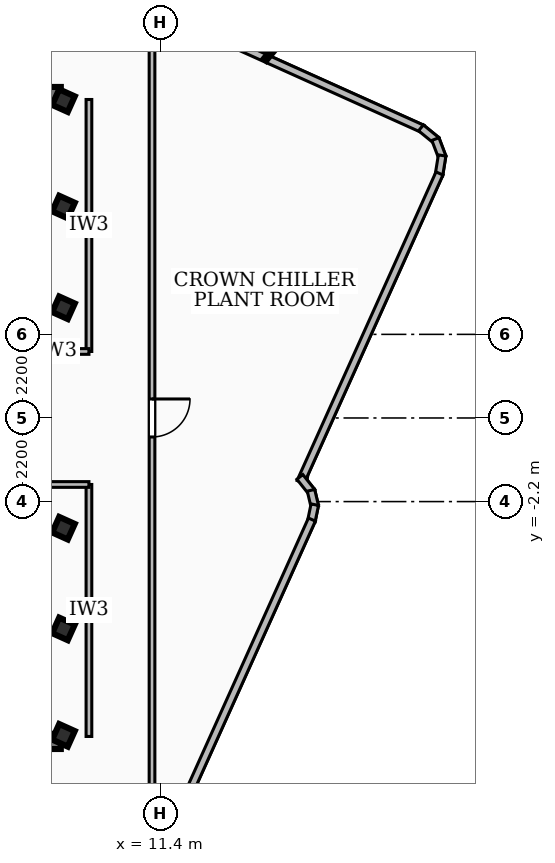
"""IFC4 building model, lengths in metres.
Left out: names, types, materials, properties, quantities, classifications, styles, units other than length and angle.
Written with IfcOpenShell. Run it as: python <this file> out.ifc"""

import sys

from ifc_helpers import new_model, si_unit, direction, frame, frame_2d, origin, origin_2d, place, context, subcontext, project, spatial, rectangle, hollow_rectangle, extrude, element, fill, save


model = new_model("IFC4")
c1 = context("Model", 3, precision=1e-05, world=origin(), true_north=direction((0.0, 1.0)))
c2 = subcontext(c1, "Body", "Model", "MODEL_VIEW")
j1 = project(units=[si_unit("LENGTHUNIT", "METRE"), si_unit("PLANEANGLEUNIT", "RADIAN")], contexts=[c1])
p1 = place(None, origin())
s1 = spatial("IfcSite", under=j1, at=p1, CompositionType="ELEMENT")
p2 = place(p1, origin())
s2 = spatial("IfcBuilding", under=s1, at=p2, CompositionType="ELEMENT")
p3 = place(p2, frame((0.0, 0.0, 297.54)))
s3 = spatial("IfcBuildingStorey", under=s2, at=p3, CompositionType="ELEMENT", Elevation=297.54)
for number, where, z_axis, x_axis in (
    (1, (-8.78, 8.51, 0.0), (0.0, 0.0, 1.0), (1.0, 0.0, 0.0)),
    (2, (8.78, -8.51, 0.0), (0.0, 0.0, 1.0), (-1.0, 0.0, 0.0)),
):
    element("IfcWall", number, at=place(p3, frame(where, z_axis=z_axis, x_axis=x_axis)), inside=s3, PredefinedType="SHEAR", context=c2, shape_type="SweptSolid", body=[
        extrude(rectangle(XDim=17.56, YDim=0.4, at=frame_2d((8.78, 0.0))), origin(), (0.0, 0.0, 1.0), 3.84),
    ])
for number, where, z_axis, x_axis in (
    (3, (8.85, -5.55, 0.0), (0.0, 0.0, 1.0), (0.411, 0.912, 0.0)),
    (4, (8.85, -2.9, 0.0), (0.0, 0.0, 1.0), (0.411, 0.912, 0.0)),
    (5, (8.85, 2.9, 0.0), (0.0, 0.0, 1.0), (0.411, 0.912, 0.0)),
    (6, (8.85, 5.55, 0.0), (0.0, 0.0, 1.0), (0.411, 0.912, 0.0)),
    (7, (8.85, -8.35, 0.0), (0.0, 0.0, 1.0), (0.411, 0.912, 0.0)),
    (8, (8.85, 8.35, 0.0), (0.0, 0.0, 1.0), (0.411, 0.912, 0.0)),
):
    element("IfcColumn", number, at=place(p3, frame(where, z_axis=z_axis, x_axis=x_axis)), inside=s3, PredefinedType="COLUMN", context=c2, shape_type="SweptSolid", body=[
        extrude(hollow_rectangle(XDim=0.45, YDim=0.45, WallThickness=0.022, at=origin_2d()), origin(), (0.0, 0.0, 1.0), 4.14),
    ])
p4 = place(p3, frame((10.126, 11.288, 0.0), z_axis=(0.0, 0.0, 1.0), x_axis=(0.911826178024, -0.410576449728, 0.0)))
e9 = element("IfcWall", 9, at=p4, inside=s3, PredefinedType="SOLIDWALL", context=c2, shape_type="SweptSolid", body=[
    extrude(rectangle(XDim=8.963, YDim=0.2, at=frame_2d((4.482, 0.0))), origin(), (0.0, 0.0, 1.0), 3.84),
])
p5 = place(p3, frame((18.257, 7.634, 0.0), z_axis=(0.0, 0.0, 1.0), x_axis=(0.773771583857, -0.63346470779, 0.0)))
e10 = element("IfcWall", 10, at=p5, inside=s3, PredefinedType="SOLIDWALL", context=c2, shape_type="SweptSolid", body=[
    extrude(rectangle(XDim=0.527, YDim=0.2, at=frame_2d((0.264, 0.0))), origin(), (0.0, 0.0, 1.0), 3.84),
])
p6 = place(p3, frame((18.637, 7.339, 0.0), z_axis=(0.0, 0.0, 1.0), x_axis=(0.354611244695, -0.935013831521, 0.0)))
e11 = element("IfcWall", 11, at=p6, inside=s3, PredefinedType="SOLIDWALL", context=c2, shape_type="SweptSolid", body=[
    extrude(rectangle(XDim=0.514, YDim=0.2, at=frame_2d((0.257, 0.0))), origin(), (0.0, 0.0, 1.0), 3.84),
])
p7 = place(p3, frame((18.814, 6.907, 0.0), z_axis=(0.0, 0.0, 1.0), x_axis=(-0.159145166984, -0.987255192858, 0.0)))
e12 = element("IfcWall", 12, at=p7, inside=s3, PredefinedType="SOLIDWALL", context=c2, shape_type="SweptSolid", body=[
    extrude(rectangle(XDim=0.528, YDim=0.2, at=frame_2d((0.264, 0.0))), origin(), (0.0, 0.0, 1.0), 3.84),
])
p8 = place(p3, frame((18.744, 6.434, 0.0), z_axis=(0.0, 0.0, 1.0), x_axis=(-0.410506010515, -0.911857892071, 0.0)))
e13 = element("IfcWall", 13, at=p8, inside=s3, PredefinedType="SOLIDWALL", context=c2, shape_type="SweptSolid", body=[
    extrude(rectangle(XDim=8.906, YDim=0.2, at=frame_2d((4.453, 0.0))), origin(), (0.0, 0.0, 1.0), 3.84),
])
p9 = place(p3, frame((15.071, -1.551, 0.0), z_axis=(0.0, 0.0, 1.0), x_axis=(0.621271987863, -0.783594995579, 0.0)))
e14 = element("IfcWall", 14, at=p9, inside=s3, PredefinedType="SOLIDWALL", context=c2, shape_type="SweptSolid", body=[
    extrude(rectangle(XDim=0.505, YDim=0.2, at=frame_2d((0.253, 0.0))), origin(), (0.0, 0.0, 1.0), 3.84),
])
p10 = place(p3, frame((15.363, -1.903, 0.0), z_axis=(0.0, 0.0, 1.0), x_axis=(0.230841504765, -0.972991366703, 0.0)))
e15 = element("IfcWall", 15, at=p10, inside=s3, PredefinedType="SOLIDWALL", context=c2, shape_type="SweptSolid", body=[
    extrude(rectangle(XDim=0.438, YDim=0.2, at=frame_2d((0.219, 0.0))), origin(), (0.0, 0.0, 1.0), 3.84),
])
p11 = place(p3, frame((15.463, -2.281, 0.0), z_axis=(0.0, 0.0, 1.0), x_axis=(-0.202605604036, -0.979260419507, 0.0)))
e16 = element("IfcWall", 16, at=p11, inside=s3, PredefinedType="SOLIDWALL", context=c2, shape_type="SweptSolid", body=[
    extrude(rectangle(XDim=0.448, YDim=0.2, at=frame_2d((0.224, 0.0))), origin(), (0.0, 0.0, 1.0), 3.84),
])
p12 = place(p3, frame((15.387, -2.673, 0.0), z_axis=(0.0, 0.0, 1.0), x_axis=(-0.41050728393, -0.911857318795, 0.0)))
e17 = element("IfcWall", 17, at=p12, inside=s3, PredefinedType="SOLIDWALL", context=c2, shape_type="SweptSolid", body=[
    extrude(rectangle(XDim=7.759, YDim=0.2, at=frame_2d((3.879, 0.0))), origin(), (0.0, 0.0, 1.0), 3.84),
])
p13 = place(p3, frame((9.52, 1.75, 0.0), z_axis=(0.0, 0.0, 1.0), x_axis=(0.0, 1.0, 0.0)))
e18 = element("IfcWall", 18, at=p13, inside=s3, PredefinedType="PARTITIONING", context=c2, shape_type="SweptSolid", body=[
    extrude(rectangle(XDim=6.63, YDim=0.15, at=frame_2d((3.315, 0.0))), origin(), (0.0, 0.0, 1.0), 3.84),
])
p14 = place(p3, frame((7.85, 1.75, 0.0), z_axis=(0.0, 0.0, 1.0), x_axis=(1.0, 0.0, 0.0)))
e19 = element("IfcWall", 19, at=p14, inside=s3, PredefinedType="PARTITIONING", context=c2, shape_type="SweptSolid", body=[
    extrude(rectangle(XDim=1.67, YDim=0.15, at=frame_2d((0.835, 0.0))), origin(), (0.0, 0.0, 1.0), 3.07),
])
p15 = place(p3, frame((9.52, -8.38, 0.0), z_axis=(0.0, 0.0, 1.0), x_axis=(0.0, 1.0, 0.0)))
e20 = element("IfcWall", 20, at=p15, inside=s3, PredefinedType="PARTITIONING", context=c2, shape_type="SweptSolid", body=[
    extrude(rectangle(XDim=6.63, YDim=0.15, at=frame_2d((3.315, 0.0))), origin(), (0.0, 0.0, 1.0), 3.21),
])
p16 = place(p3, frame((7.85, -1.75, 0.0), z_axis=(0.0, 0.0, 1.0), x_axis=(1.0, 0.0, 0.0)))
e21 = element("IfcWall", 21, at=p16, inside=s3, PredefinedType="PARTITIONING", context=c2, shape_type="SweptSolid", body=[
    extrude(rectangle(XDim=1.67, YDim=0.15, at=frame_2d((0.835, 0.0))), origin(), (0.0, 0.0, 1.0), 3.07),
])
p17 = place(p3, frame((11.18, 10.742, 0.0), z_axis=(0.0, 0.0, 1.0), x_axis=(0.0, -1.0, 0.0)))
e22 = element("IfcWall", 22, at=p17, inside=s3, PredefinedType="PARTITIONING", context=c2, shape_type="SweptSolid", body=[
    extrude(rectangle(XDim=21.02, YDim=0.15, at=frame_2d((10.51, 0.0))), origin(), (0.0, 0.0, 1.0), 3.21),
])
p18 = place(p17, frame((10.242, 0.0, 0.0)))
e23 = element("IfcOpeningElement", 23, at=p18, cuts=e22, PredefinedType="OPENING", context=c2, shape_type="SweptSolid", body=[
    extrude(rectangle(XDim=1.0, YDim=2.1, at=frame_2d((0.5, 1.05))), frame((0.0, 0.085, 0.0), z_axis=(0.0, -1.0, 0.0), x_axis=(1.0, 0.0, 0.0)), (0.0, 0.0, 1.0), 0.17),
])
p19 = place(p18, origin())
e24 = element("IfcDoor", 24, at=p19, inside=s3, OperationType="SINGLE_SWING_LEFT", PredefinedType="DOOR", context=c2, shape_type="SweptSolid", body=[
    extrude(rectangle(XDim=1.0, YDim=2.1, at=frame_2d((0.5, 1.05))), frame((0.0, 0.025, 0.0), z_axis=(0.0, -1.0, 0.0), x_axis=(1.0, 0.0, 0.0)), (0.0, 0.0, 1.0), 0.05),
])
fill(e23, e24)
save(model, sys.argv[1])
